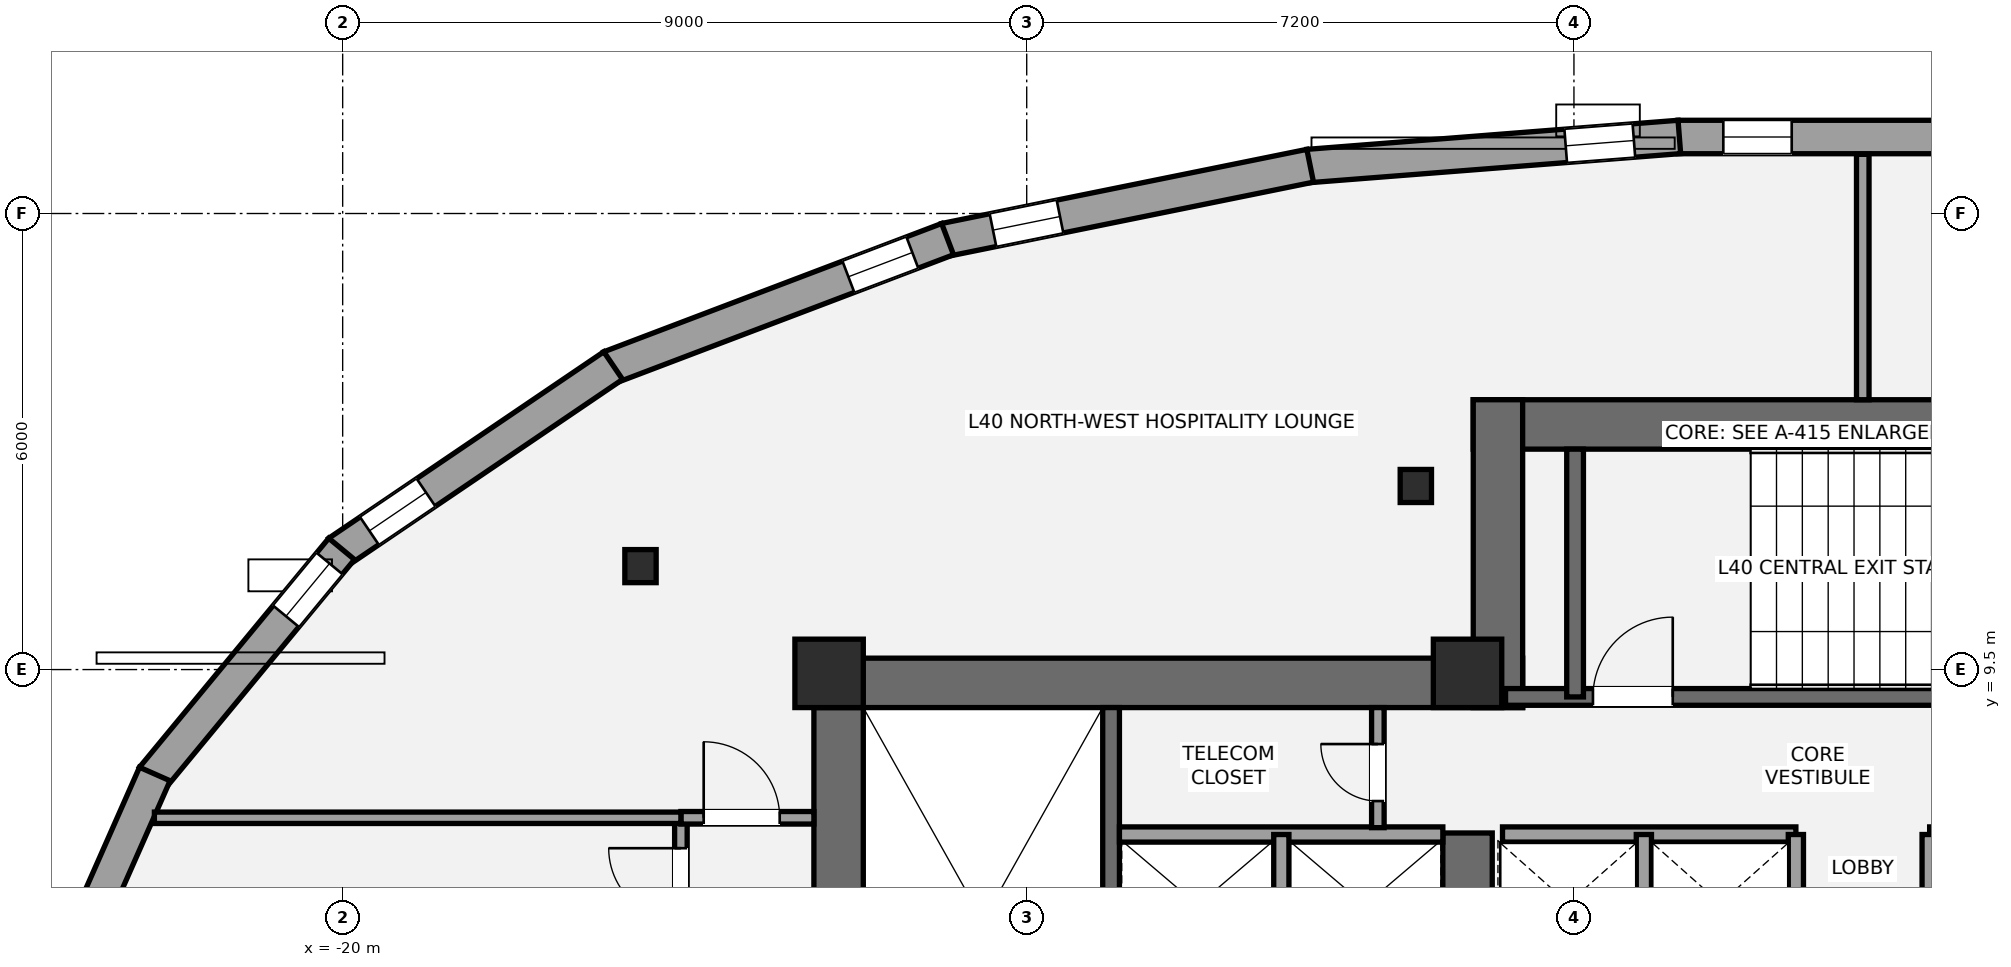
"""IFC4 building model, lengths in metres.
Left out: names, types, materials, properties, quantities, classifications, styles, units other than length and angle.
Written with IfcOpenShell. Run it as: python <this file> out.ifc"""

import sys

from ifc_helpers import new_model, si_unit, direction, frame, frame_2d, origin, origin_2d, place, context, subcontext, project, spatial, rectangle, i_section, extrude, element, fill, save


model = new_model("IFC4")
c1 = context("Model", 3, precision=1e-05, world=origin(), true_north=direction((0.0, 1.0)))
c2 = subcontext(c1, "Body", "Model", "MODEL_VIEW")
j1 = project(units=[si_unit("LENGTHUNIT", "METRE"), si_unit("PLANEANGLEUNIT", "RADIAN")], contexts=[c1])
p1 = place(None, origin())
s1 = spatial("IfcSite", under=j1, at=p1, CompositionType="ELEMENT")
p2 = place(p1, origin())
s2 = spatial("IfcBuilding", under=s1, at=p2, CompositionType="ELEMENT")
p3 = place(p2, frame((0.0, 0.0, 150.2)))
s3 = spatial("IfcBuildingStorey", under=s2, at=p3, CompositionType="ELEMENT", Elevation=150.2)
p4 = place(p3, frame((-13.475, 1.2, 0.0), z_axis=(0.0, 0.0, 1.0), x_axis=(0.0, 1.0, 0.0)))
e1 = element("IfcWall", 1, at=p4, inside=s3, PredefinedType="SHEAR", context=c2, shape_type="SweptSolid", body=[
    extrude(rectangle(XDim=8.45, YDim=0.65, at=frame_2d((4.225, 0.0))), origin(), (0.0, 0.0, 1.0), 3.2),
])
p5 = place(p3, frame((-13.8, 9.325, 0.0), z_axis=(0.0, 0.0, 1.0), x_axis=(1.0, 0.0, 0.0)))
e2 = element("IfcWall", 2, at=p5, inside=s3, PredefinedType="SHEAR", context=c2, shape_type="SweptSolid", body=[
    extrude(rectangle(XDim=9.325, YDim=0.65, at=frame_2d((4.663, 0.0))), origin(), (0.0, 0.0, 1.0), 3.2),
])
p6 = place(p3, frame((-5.2, 5.35, 0.0), z_axis=(0.0, 0.0, 1.0), x_axis=(0.0, 1.0, 0.0)))
e3 = element("IfcWall", 3, at=p6, inside=s3, PredefinedType="SHEAR", context=c2, shape_type="SweptSolid", body=[
    extrude(rectangle(XDim=2.0, YDim=0.65, at=frame_2d((1.0, 0.0))), origin(), (0.0, 0.0, 1.0), 3.2),
])
p7 = place(p3, frame((-9.89, 1.85, 0.0), z_axis=(0.0, 0.0, 1.0), x_axis=(0.0, 1.0, 0.0)))
e4 = element("IfcWall", 4, at=p7, inside=s3, PredefinedType="SHEAR", context=c2, shape_type="SweptSolid", body=[
    extrude(rectangle(XDim=7.15, YDim=0.22, at=frame_2d((3.575, 0.0))), origin(), (0.0, 0.0, 1.0), 3.2),
])
p8 = place(p3, frame((-5.125, 12.725, 0.0), z_axis=(0.0, 0.0, 1.0), x_axis=(1.0, 0.0, 0.0)))
e5 = element("IfcWall", 5, at=p8, inside=s3, PredefinedType="SHEAR", context=c2, shape_type="SweptSolid", body=[
    extrude(rectangle(XDim=10.25, YDim=0.65, at=frame_2d((5.125, 0.0))), origin(), (0.0, 0.0, 1.0), 3.2),
])
p9 = place(p3, frame((-4.8, 9.0, 0.0), z_axis=(0.0, 0.0, 1.0), x_axis=(0.0, 1.0, 0.0)))
e6 = element("IfcWall", 6, at=p9, inside=s3, PredefinedType="SHEAR", context=c2, shape_type="SweptSolid", body=[
    extrude(rectangle(XDim=4.05, YDim=0.65, at=frame_2d((2.025, 0.0))), origin(), (0.0, 0.0, 1.0), 3.2),
])
p10 = place(p3, frame((-4.7, 9.14, 0.0), z_axis=(0.0, 0.0, 1.0), x_axis=(1.0, 0.0, 0.0)))
e7 = element("IfcWall", 7, at=p10, inside=s3, PredefinedType="SHEAR", context=c2, shape_type="SweptSolid", body=[
    extrude(rectangle(XDim=9.3, YDim=0.22, at=frame_2d((4.65, 0.0))), origin(), (0.0, 0.0, 1.0), 3.2),
])
p11 = place(p10, frame((1.15, 0.0, 0.0)))
e8 = element("IfcOpeningElement", 8, at=p11, cuts=e7, PredefinedType="OPENING", context=c2, shape_type="SweptSolid", body=[
    extrude(rectangle(XDim=1.05, YDim=2.15, at=frame_2d((0.525, 1.075))), frame((0.0, 0.12, 0.0), z_axis=(0.0, -1.0, 0.0), x_axis=(1.0, 0.0, 0.0)), (0.0, 0.0, 1.0), 0.24),
])
p12 = place(p3, frame((-3.785, 9.14, 0.0), z_axis=(0.0, 0.0, 1.0), x_axis=(0.0, 1.0, 0.0)))
e9 = element("IfcWall", 9, at=p12, inside=s3, PredefinedType="SHEAR", context=c2, shape_type="SweptSolid", body=[
    extrude(rectangle(XDim=3.26, YDim=0.22, at=frame_2d((1.63, 0.0))), origin(), (0.0, 0.0, 1.0), 3.2),
])
for number, where, z_axis, x_axis in (
    (10, (-13.6, 9.45, 0.0), (0.0, 0.0, 1.0), (1.0, 0.0, 0.0)),
    (11, (-5.2, 9.45, 0.0), (0.0, 0.0, 1.0), (1.0, 0.0, 0.0)),
):
    element("IfcColumn", number, at=place(p3, frame(where, z_axis=z_axis, x_axis=x_axis)), inside=s3, PredefinedType="COLUMN", context=c2, shape_type="SweptSolid", body=[
        extrude(rectangle(XDim=0.9, YDim=0.9, at=origin_2d()), origin(), (0.0, 0.0, 1.0), 3.2),
    ])
for number, where, z_axis, x_axis in (
    (12, (-5.88, 11.915, 0.0), (0.0, 0.0, 1.0), (1.0, 0.0, 0.0)),
    (13, (-16.082, 10.861, 0.0), (0.0, 0.0, 1.0), (1.0, 0.0, 0.0)),
):
    element("IfcColumn", number, at=place(p3, frame(where, z_axis=z_axis, x_axis=x_axis)), inside=s3, PredefinedType="COLUMN", context=c2, shape_type="SweptSolid", body=[
        extrude(i_section(OverallWidth=0.412, OverallDepth=0.435, WebThickness=0.036, FlangeThickness=0.057, at=origin_2d()), origin(), (0.0, 0.0, 1.0), 3.2),
    ])
p13 = place(p3, frame((-2.43, 16.507, 0.0), z_axis=(0.0, 0.0, 1.0), x_axis=(1.0, 0.0, 0.0)))
e14 = element("IfcWall", 14, at=p13, inside=s3, PredefinedType="STANDARD", context=c2, shape_type="SweptSolid", body=[
    extrude(rectangle(XDim=4.861, YDim=0.44, at=frame_2d((2.43, 0.0))), origin(), (0.0, 0.0, 1.0), 2.315),
])
p14 = place(p13, frame((0.596, 0.0, 0.58)))
e15 = element("IfcOpeningElement", 15, at=p14, cuts=e14, PredefinedType="OPENING", context=c2, shape_type="SweptSolid", body=[
    extrude(rectangle(XDim=0.9, YDim=1.35, at=frame_2d((0.45, 0.675))), frame((0.0, 0.23, 0.0), z_axis=(0.0, -1.0, 0.0), x_axis=(1.0, 0.0, 0.0)), (0.0, 0.0, 1.0), 0.46),
])
p15 = place(p3, frame((-7.297, 16.125, 0.0), z_axis=(0.0, 0.0, 1.0), x_axis=(0.996946218403, 0.078091213409, 0.0)))
e16 = element("IfcWall", 16, at=p15, inside=s3, PredefinedType="STANDARD", context=c2, shape_type="SweptSolid", body=[
    extrude(rectangle(XDim=4.899, YDim=0.44, at=frame_2d((2.449, 0.0))), origin(), (0.0, 0.0, 1.0), 2.315),
])
p16 = place(p15, frame((3.399, 0.0, 0.58)))
e17 = element("IfcOpeningElement", 17, at=p16, cuts=e16, PredefinedType="OPENING", context=c2, shape_type="SweptSolid", body=[
    extrude(rectangle(XDim=0.9, YDim=1.35, at=frame_2d((0.45, 0.675))), frame((0.0, 0.23, 0.0), z_axis=(0.0, -1.0, 0.0), x_axis=(1.0, 0.0, 0.0)), (0.0, 0.0, 1.0), 0.46),
])
p17 = place(p3, frame((-12.075, 15.153, 0.0), z_axis=(0.0, 0.0, 1.0), x_axis=(0.980021305588, 0.198892535291, 0.0)))
e18 = element("IfcWall", 18, at=p17, inside=s3, PredefinedType="STANDARD", context=c2, shape_type="SweptSolid", body=[
    extrude(rectangle(XDim=4.903, YDim=0.44, at=frame_2d((2.451, 0.0))), origin(), (0.0, 0.0, 1.0), 2.315),
])
p18 = place(p17, frame((0.644, 0.0, 0.58)))
e19 = element("IfcOpeningElement", 19, at=p18, cuts=e18, PredefinedType="OPENING", context=c2, shape_type="SweptSolid", body=[
    extrude(rectangle(XDim=0.9, YDim=1.35, at=frame_2d((0.45, 0.675))), frame((0.0, 0.23, 0.0), z_axis=(0.0, -1.0, 0.0), x_axis=(1.0, 0.0, 0.0)), (0.0, 0.0, 1.0), 0.46),
])
p19 = place(p3, frame((-16.486, 13.475, 0.0), z_axis=(0.0, 0.0, 1.0), x_axis=(0.93488004884, 0.354963792916, 0.0)))
e20 = element("IfcWall", 20, at=p19, inside=s3, PredefinedType="STANDARD", context=c2, shape_type="SweptSolid", body=[
    extrude(rectangle(XDim=4.755, YDim=0.44, at=frame_2d((2.377, 0.0))), origin(), (0.0, 0.0, 1.0), 2.315),
])
p20 = place(p19, frame((3.358, 0.0, 0.58)))
e21 = element("IfcOpeningElement", 21, at=p20, cuts=e20, PredefinedType="OPENING", context=c2, shape_type="SweptSolid", body=[
    extrude(rectangle(XDim=0.9, YDim=1.35, at=frame_2d((0.45, 0.675))), frame((0.0, 0.23, 0.0), z_axis=(0.0, -1.0, 0.0), x_axis=(1.0, 0.0, 0.0)), (0.0, 0.0, 1.0), 0.46),
])
p21 = place(p3, frame((-20.06, 11.046, 0.0), z_axis=(0.0, 0.0, 1.0), x_axis=(0.827782339513, 0.561049372507, 0.0)))
e22 = element("IfcWall", 22, at=p21, inside=s3, PredefinedType="STANDARD", context=c2, shape_type="SweptSolid", body=[
    extrude(rectangle(XDim=4.372, YDim=0.44, at=frame_2d((2.186, 0.0))), origin(), (0.0, 0.0, 1.0), 2.315),
])
p22 = place(p21, frame((0.497, 0.0, 0.58)))
e23 = element("IfcOpeningElement", 23, at=p22, cuts=e22, PredefinedType="OPENING", context=c2, shape_type="SweptSolid", body=[
    extrude(rectangle(XDim=0.9, YDim=1.35, at=frame_2d((0.45, 0.675))), frame((0.0, 0.23, 0.0), z_axis=(0.0, -1.0, 0.0), x_axis=(1.0, 0.0, 0.0)), (0.0, 0.0, 1.0), 0.46),
])
p23 = place(p3, frame((-22.504, 8.075, 0.0), z_axis=(0.0, 0.0, 1.0), x_axis=(0.637002505989, 0.77086173038, 0.0)))
e24 = element("IfcWall", 24, at=p23, inside=s3, PredefinedType="STANDARD", context=c2, shape_type="SweptSolid", body=[
    extrude(rectangle(XDim=3.908, YDim=0.44, at=frame_2d((1.954, 0.0))), origin(), (0.0, 0.0, 1.0), 2.315),
])
p24 = place(p23, frame((2.76, 0.0, 0.42)))
e25 = element("IfcOpeningElement", 25, at=p24, cuts=e24, PredefinedType="OPENING", context=c2, shape_type="SweptSolid", body=[
    extrude(rectangle(XDim=0.9, YDim=1.35, at=frame_2d((0.45, 0.675))), frame((0.0, 0.23, 0.0), z_axis=(0.0, -1.0, 0.0), x_axis=(1.0, 0.0, 0.0)), (0.0, 0.0, 1.0), 0.46),
])
p25 = place(p3, frame((-23.911, 4.869, 0.0), z_axis=(0.0, 0.0, 1.0), x_axis=(0.403999745193, 0.914759097186, 0.0)))
e26 = element("IfcWall", 26, at=p25, inside=s3, PredefinedType="STANDARD", context=c2, shape_type="SweptSolid", body=[
    extrude(rectangle(XDim=3.561, YDim=0.44, at=frame_2d((1.78, 0.0))), origin(), (0.0, 0.0, 1.0), 2.315),
])
p26 = place(p25, frame((0.14, 0.0, 0.42)))
e27 = element("IfcOpeningElement", 27, at=p26, cuts=e26, PredefinedType="OPENING", context=c2, shape_type="SweptSolid", body=[
    extrude(rectangle(XDim=0.9, YDim=1.35, at=frame_2d((0.45, 0.675))), frame((0.0, 0.23, 0.0), z_axis=(0.0, -1.0, 0.0), x_axis=(1.0, 0.0, 0.0)), (0.0, 0.0, 1.0), 0.46),
])
p27 = place(p3, frame((-9.78, 7.33, 0.0), z_axis=(0.0, 0.0, 1.0), x_axis=(1.0, 0.0, 0.0)))
e28 = element("IfcWall", 28, at=p27, inside=s3, PredefinedType="SOLIDWALL", context=c2, shape_type="SweptSolid", body=[
    extrude(rectangle(XDim=4.255, YDim=0.2, at=frame_2d((2.127, 0.0))), origin(), (0.0, 0.0, 1.0), 3.02),
])
p28 = place(p3, frame((-7.65, 5.47, 0.0), z_axis=(0.0, 0.0, 1.0), x_axis=(0.0, 1.0, 0.0)))
e29 = element("IfcWall", 29, at=p28, inside=s3, PredefinedType="SOLIDWALL", context=c2, shape_type="SweptSolid", body=[
    extrude(rectangle(XDim=1.86, YDim=0.2, at=frame_2d((0.93, 0.0))), origin(), (0.0, 0.0, 1.0), 3.02),
])
for number, where, z_axis, x_axis in (
    (30, (-4.74, 7.33, 0.0), (0.0, 0.0, 1.0), (1.0, 0.0, 0.0)),
    (31, (0.88, 7.33, 0.0), (0.0, 0.0, 1.0), (1.0, 0.0, 0.0)),
):
    element("IfcWall", number, at=place(p3, frame(where, z_axis=z_axis, x_axis=x_axis)), inside=s3, PredefinedType="SOLIDWALL", context=c2, shape_type="SweptSolid", body=[
        extrude(rectangle(XDim=3.86, YDim=0.2, at=frame_2d((1.93, 0.0))), origin(), (0.0, 0.0, 1.0), 3.02),
    ])
for number, where, z_axis, x_axis in (
    (32, (-2.88, 5.52, 0.0), (0.0, 0.0, 1.0), (0.0, 1.0, 0.0)),
    (33, (-0.88, 5.52, 0.0), (0.0, 0.0, 1.0), (0.0, 1.0, 0.0)),
    (34, (0.88, 5.52, 0.0), (0.0, 0.0, 1.0), (0.0, 1.0, 0.0)),
):
    element("IfcWall", number, at=place(p3, frame(where, z_axis=z_axis, x_axis=x_axis)), inside=s3, PredefinedType="SOLIDWALL", context=c2, shape_type="SweptSolid", body=[
        extrude(rectangle(XDim=1.81, YDim=0.2, at=frame_2d((0.905, 0.0))), origin(), (0.0, 0.0, 1.0), 3.02),
    ])
p29 = place(p3, frame((-6.38, 7.42, 0.0), z_axis=(0.0, 0.0, 1.0), x_axis=(0.0, 1.0, 0.0)))
e35 = element("IfcWall", 35, at=p29, inside=s3, PredefinedType="PARTITIONING", context=c2, shape_type="SweptSolid", body=[
    extrude(rectangle(XDim=1.58, YDim=0.165, at=frame_2d((0.79, 0.0))), origin(), (0.0, 0.0, 1.0), 3.02),
])
p30 = place(p29, frame((0.35, 0.0, 0.0)))
e36 = element("IfcOpeningElement", 36, at=p30, cuts=e35, PredefinedType="OPENING", context=c2, shape_type="SweptSolid", body=[
    extrude(rectangle(XDim=0.75, YDim=2.1, at=frame_2d((0.375, 1.05))), frame((0.0, 0.093, 0.0), z_axis=(0.0, -1.0, 0.0), x_axis=(1.0, 0.0, 0.0)), (0.0, 0.0, 1.0), 0.185),
])
p31 = place(p3, frame((-15.55, -13.587, 0.0), z_axis=(0.0, 0.0, 1.0), x_axis=(0.0, 1.0, 0.0)))
e37 = element("IfcWall", 37, at=p31, inside=s3, PredefinedType="PARTITIONING", context=c2, shape_type="SweptSolid", body=[
    extrude(rectangle(XDim=21.137, YDim=0.165, at=frame_2d((10.568, 0.0))), origin(), (0.0, 0.0, 1.0), 2.473),
])
p32 = place(p31, frame((6.587, 0.0, 0.0)))
e38 = element("IfcOpeningElement", 38, at=p32, cuts=e37, PredefinedType="OPENING", context=c2, shape_type="SweptSolid", body=[
    extrude(rectangle(XDim=0.85, YDim=2.1, at=frame_2d((0.425, 1.05))), frame((0.0, 0.093, 0.0), z_axis=(0.0, -1.0, 0.0), x_axis=(1.0, 0.0, 0.0)), (0.0, 0.0, 1.0), 0.185),
])
p33 = place(p31, frame((10.637, 0.0, 0.0)))
e39 = element("IfcOpeningElement", 39, at=p33, cuts=e37, PredefinedType="OPENING", context=c2, shape_type="SweptSolid", body=[
    extrude(rectangle(XDim=0.95, YDim=2.15, at=frame_2d((0.475, 1.075))), frame((0.0, 0.093, 0.0), z_axis=(0.0, -1.0, 0.0), x_axis=(1.0, 0.0, 0.0)), (0.0, 0.0, 1.0), 0.185),
])
p34 = place(p31, frame((15.037, 0.0, 0.0)))
e40 = element("IfcOpeningElement", 40, at=p34, cuts=e37, PredefinedType="OPENING", context=c2, shape_type="SweptSolid", body=[
    extrude(rectangle(XDim=0.95, YDim=2.15, at=frame_2d((0.475, 1.075))), frame((0.0, 0.093, 0.0), z_axis=(0.0, -1.0, 0.0), x_axis=(1.0, 0.0, 0.0)), (0.0, 0.0, 1.0), 0.185),
])
p35 = place(p31, frame((19.787, 0.0, 0.0)))
e41 = element("IfcOpeningElement", 41, at=p35, cuts=e37, PredefinedType="OPENING", context=c2, shape_type="SweptSolid", body=[
    extrude(rectangle(XDim=0.95, YDim=2.15, at=frame_2d((0.475, 1.075))), frame((0.0, 0.093, 0.0), z_axis=(0.0, -1.0, 0.0), x_axis=(1.0, 0.0, 0.0)), (0.0, 0.0, 1.0), 0.185),
])
p36 = place(p3, frame((-15.55, 7.55, 0.0), z_axis=(0.0, 0.0, 1.0), x_axis=(1.0, 0.0, 0.0)))
e42 = element("IfcWall", 42, at=p36, inside=s3, PredefinedType="PARTITIONING", context=c2, shape_type="SweptSolid", body=[
    extrude(rectangle(XDim=1.75, YDim=0.165, at=frame_2d((0.875, 0.0))), origin(), (0.0, 0.0, 1.0), 3.02),
])
p37 = place(p36, frame((0.3, 0.0, 0.0)))
e43 = element("IfcOpeningElement", 43, at=p37, cuts=e42, PredefinedType="OPENING", context=c2, shape_type="SweptSolid", body=[
    extrude(rectangle(XDim=1.0, YDim=2.15, at=frame_2d((0.5, 1.075))), frame((0.0, 0.093, 0.0), z_axis=(0.0, -1.0, 0.0), x_axis=(1.0, 0.0, 0.0)), (0.0, 0.0, 1.0), 0.185),
])
p38 = place(p3, frame((-22.477, 7.55, 0.0), z_axis=(0.0, 0.0, 1.0), x_axis=(1.0, 0.0, 0.0)))
e44 = element("IfcWall", 44, at=p38, inside=s3, PredefinedType="PLUMBINGWALL", context=c2, shape_type="SweptSolid", body=[
    extrude(rectangle(XDim=6.927, YDim=0.15, at=frame_2d((3.464, 0.0))), origin(), (0.0, 0.0, 1.0), 2.473),
])
p39 = place(p3, frame((0.0, 13.05, 0.0), z_axis=(0.0, 0.0, 1.0), x_axis=(0.0, 1.0, 0.0)))
e45 = element("IfcWall", 45, at=p39, inside=s3, PredefinedType="PARTITIONING", context=c2, shape_type="SweptSolid", body=[
    extrude(rectangle(XDim=3.229, YDim=0.165, at=frame_2d((1.614, 0.0))), origin(), (0.0, 0.0, 1.0), 3.02),
])
p40 = place(p14, origin())
e46 = element("IfcWindow", 46, at=p40, inside=s3, PartitioningType="SINGLE_PANEL", PredefinedType="WINDOW", context=c2, shape_type="SweptSolid", body=[
    extrude(rectangle(XDim=0.9, YDim=1.35, at=frame_2d((0.45, 0.675))), frame((0.0, -0.01, 0.0), z_axis=(0.0, -1.0, 0.0), x_axis=(1.0, 0.0, 0.0)), (0.0, 0.0, 1.0), 0.06),
])
fill(e15, e46)
p41 = place(p16, origin())
e47 = element("IfcWindow", 47, at=p41, inside=s3, PartitioningType="SINGLE_PANEL", PredefinedType="WINDOW", context=c2, shape_type="SweptSolid", body=[
    extrude(rectangle(XDim=0.9, YDim=1.35, at=frame_2d((0.45, 0.675))), frame((0.0, -0.01, 0.0), z_axis=(0.0, -1.0, 0.0), x_axis=(1.0, 0.0, 0.0)), (0.0, 0.0, 1.0), 0.06),
])
fill(e17, e47)
p42 = place(p18, origin())
e48 = element("IfcWindow", 48, at=p42, inside=s3, PartitioningType="SINGLE_PANEL", PredefinedType="WINDOW", context=c2, shape_type="SweptSolid", body=[
    extrude(rectangle(XDim=0.9, YDim=1.35, at=frame_2d((0.45, 0.675))), frame((0.0, -0.01, 0.0), z_axis=(0.0, -1.0, 0.0), x_axis=(1.0, 0.0, 0.0)), (0.0, 0.0, 1.0), 0.06),
])
fill(e19, e48)
p43 = place(p20, origin())
e49 = element("IfcWindow", 49, at=p43, inside=s3, PartitioningType="SINGLE_PANEL", PredefinedType="WINDOW", context=c2, shape_type="SweptSolid", body=[
    extrude(rectangle(XDim=0.9, YDim=1.35, at=frame_2d((0.45, 0.675))), frame((0.0, -0.01, 0.0), z_axis=(0.0, -1.0, 0.0), x_axis=(1.0, 0.0, 0.0)), (0.0, 0.0, 1.0), 0.06),
])
fill(e21, e49)
p44 = place(p22, origin())
e50 = element("IfcWindow", 50, at=p44, inside=s3, PartitioningType="SINGLE_PANEL", PredefinedType="WINDOW", context=c2, shape_type="SweptSolid", body=[
    extrude(rectangle(XDim=0.9, YDim=1.35, at=frame_2d((0.45, 0.675))), frame((0.0, -0.01, 0.0), z_axis=(0.0, -1.0, 0.0), x_axis=(1.0, 0.0, 0.0)), (0.0, 0.0, 1.0), 0.06),
])
fill(e23, e50)
p45 = place(p24, origin())
e51 = element("IfcWindow", 51, at=p45, inside=s3, PartitioningType="SINGLE_PANEL", PredefinedType="WINDOW", context=c2, shape_type="SweptSolid", body=[
    extrude(rectangle(XDim=0.9, YDim=1.35, at=frame_2d((0.45, 0.675))), frame((0.0, -0.01, 0.0), z_axis=(0.0, -1.0, 0.0), x_axis=(1.0, 0.0, 0.0)), (0.0, 0.0, 1.0), 0.06),
])
fill(e25, e51)
p46 = place(p11, origin())
e52 = element("IfcDoor", 52, at=p46, inside=s3, OperationType="SINGLE_SWING_RIGHT", PredefinedType="DOOR", context=c2, shape_type="SweptSolid", body=[
    extrude(rectangle(XDim=1.05, YDim=2.15, at=frame_2d((0.525, 1.075))), frame((0.0, 0.025, 0.0), z_axis=(0.0, -1.0, 0.0), x_axis=(1.0, 0.0, 0.0)), (0.0, 0.0, 1.0), 0.05),
])
fill(e8, e52)
p47 = place(p30, origin())
e53 = element("IfcDoor", 53, at=p47, inside=s3, OperationType="SINGLE_SWING_RIGHT", PredefinedType="DOOR", context=c2, shape_type="SweptSolid", body=[
    extrude(rectangle(XDim=0.75, YDim=2.1, at=frame_2d((0.375, 1.05))), frame((0.0, 0.025, 0.0), z_axis=(0.0, -1.0, 0.0), x_axis=(1.0, 0.0, 0.0)), (0.0, 0.0, 1.0), 0.05),
])
fill(e36, e53)
p48 = place(p37, origin())
e54 = element("IfcDoor", 54, at=p48, inside=s3, OperationType="SINGLE_SWING_LEFT", PredefinedType="DOOR", context=c2, shape_type="SweptSolid", body=[
    extrude(rectangle(XDim=1.0, YDim=2.15, at=frame_2d((0.5, 1.075))), frame((0.0, 0.025, 0.0), z_axis=(0.0, -1.0, 0.0), x_axis=(1.0, 0.0, 0.0)), (0.0, 0.0, 1.0), 0.05),
])
fill(e43, e54)
p49 = place(p35, origin())
e55 = element("IfcDoor", 55, at=p49, inside=s3, OperationType="SINGLE_SWING_RIGHT", PredefinedType="DOOR", context=c2, shape_type="SweptSolid", body=[
    extrude(rectangle(XDim=0.95, YDim=2.15, at=frame_2d((0.475, 1.075))), frame((0.0, 0.025, 0.0), z_axis=(0.0, -1.0, 0.0), x_axis=(1.0, 0.0, 0.0)), (0.0, 0.0, 1.0), 0.05),
])
fill(e41, e55)
save(model, sys.argv[1])
